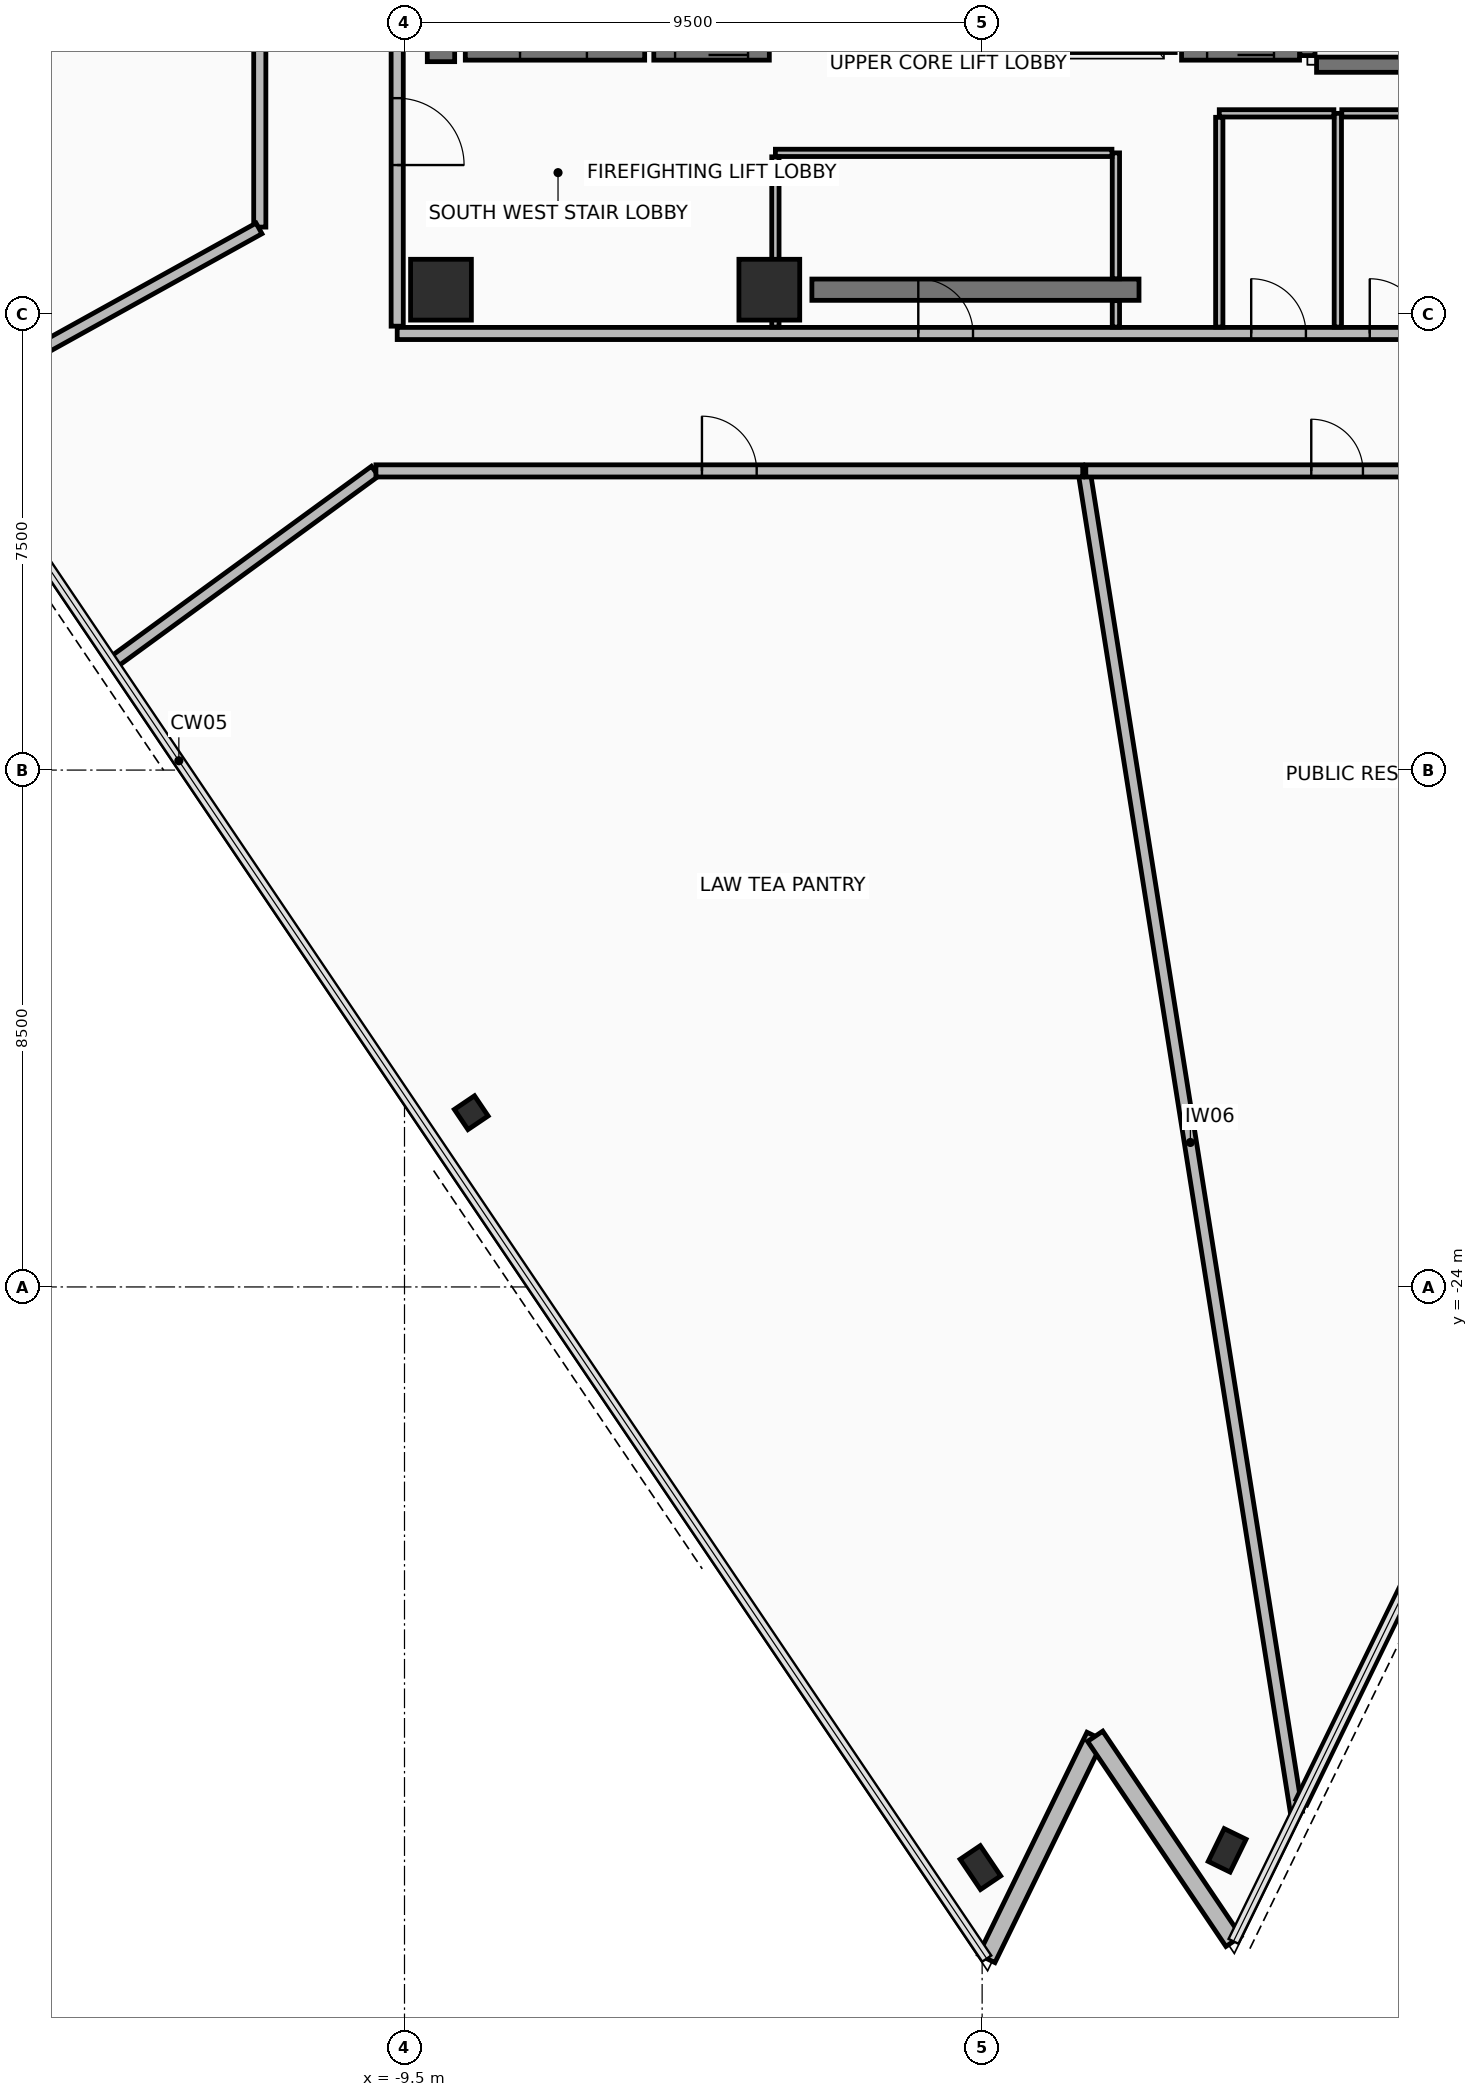
"""IFC4 building model, lengths in metres.
Left out: names, types, materials, properties, quantities, classifications, styles, units other than length and angle.
Written with IfcOpenShell. Run it as: python <this file> out.ifc"""

import sys

from ifc_helpers import new_model, si_unit, direction, frame, frame_2d, origin, origin_2d, place, context, subcontext, project, spatial, rectangle, hollow_rectangle, extrude, element, fill, save


model = new_model("IFC4")
c1 = context("Model", 3, precision=1e-05, world=origin(), true_north=direction((0.0, 1.0)))
c2 = subcontext(c1, "Body", "Model", "MODEL_VIEW")
j1 = project(units=[si_unit("LENGTHUNIT", "METRE"), si_unit("PLANEANGLEUNIT", "RADIAN")], contexts=[c1])
p1 = place(None, origin())
s1 = spatial("IfcSite", under=j1, at=p1, CompositionType="ELEMENT")
p2 = place(p1, origin())
s2 = spatial("IfcBuilding", under=s1, at=p2, CompositionType="ELEMENT")
p3 = place(p2, frame((0.0, 0.0, 267.8)))
s3 = spatial("IfcBuildingStorey", under=s2, at=p3, CompositionType="ELEMENT", Elevation=267.8)
for number, where, z_axis, x_axis in (
    (1, (-8.9, -7.6, 0.0), (0.0, 0.0, 1.0), (1.0, 0.0, 0.0)),
    (2, (-3.5, -7.6, 0.0), (0.0, 0.0, 1.0), (1.0, 0.0, 0.0)),
):
    element("IfcColumn", number, at=place(p3, frame(where, z_axis=z_axis, x_axis=x_axis)), inside=s3, PredefinedType="COLUMN", context=c2, shape_type="SweptSolid", body=[
        extrude(rectangle(XDim=1.0, YDim=1.0, at=origin_2d()), origin(), (0.0, 0.0, 1.0), 3.6),
    ])
p4 = place(p3, frame((-8.402, -21.135, 0.0), z_axis=(0.0, 0.0, 1.0), x_axis=(-0.559192903471, 0.829037572555, 0.0)))
e3 = element("IfcColumn", 3, at=p4, inside=s3, PredefinedType="COLUMN", context=c2, shape_type="SweptSolid", body=[
    extrude(hollow_rectangle(XDim=0.4, YDim=0.4, WallThickness=0.025, at=origin_2d()), origin(), (0.0, 0.0, 1.0), 3.6),
])
for number, where, z_axis, x_axis in (
    (4, (-0.029, -33.549, 0.0), (0.0, 0.0, 1.0), (-0.559, 0.829, 0.0)),
    (5, (4.029, -33.265, 0.0), (0.0, 0.0, 1.0), (0.438, 0.899, 0.0)),
):
    element("IfcColumn", number, at=place(p3, frame(where, z_axis=z_axis, x_axis=x_axis)), inside=s3, PredefinedType="COLUMN", context=c2, shape_type="SweptSolid", body=[
        extrude(hollow_rectangle(XDim=0.4, YDim=0.6, WallThickness=0.03, at=origin_2d()), origin(), (0.0, 0.0, 1.0), 3.6),
    ])
p5 = place(p3, frame((0.076, -35.045, 0.0), z_axis=(0.0, 0.0, 1.0), x_axis=(0.438357414153, 0.898800744024, 0.0)))
e6 = element("IfcWall", 6, at=p5, inside=s3, PredefinedType="STANDARD", context=c2, shape_type="SweptSolid", body=[
    extrude(rectangle(XDim=4.068, YDim=0.3, at=frame_2d((2.034, 0.0))), origin(), (0.0, 0.0, 1.0), 2.765),
])
p6 = place(p3, frame((1.859, -31.389, 0.0), z_axis=(0.0, 0.0, 1.0), x_axis=(0.559206900681, -0.829028131145, 0.0)))
e7 = element("IfcWall", 7, at=p6, inside=s3, PredefinedType="STANDARD", context=c2, shape_type="SweptSolid", body=[
    extrude(rectangle(XDim=4.068, YDim=0.3, at=frame_2d((2.034, 0.0))), origin(), (0.0, 0.0, 1.0), 2.765),
])
p7 = place(p3, frame((-2.8, -7.6, 0.0), z_axis=(0.0, 0.0, 1.0), x_axis=(1.0, 0.0, 0.0)))
e8 = element("IfcWall", 8, at=p7, inside=s3, PredefinedType="SHEAR", context=c2, shape_type="SweptSolid", body=[
    extrude(rectangle(XDim=5.38, YDim=0.35, at=frame_2d((2.69, 0.0))), origin(), (0.0, 0.0, 1.0), 3.42),
])
p8 = place(p3, frame((-8.9, -3.85, 0.0), z_axis=(0.0, 0.0, 1.0), x_axis=(0.0, 1.0, 0.0)))
e9 = element("IfcWall", 9, at=p8, inside=s3, PredefinedType="SHEAR", context=c2, shape_type="SweptSolid", body=[
    extrude(rectangle(XDim=10.7, YDim=0.45, at=frame_2d((5.35, 0.0))), origin(), (0.0, 0.0, 1.0), 3.42),
])
p9 = place(p3, frame((-9.62, -8.32, 0.0), z_axis=(0.0, 0.0, 1.0), x_axis=(1.0, 0.0, 0.0)))
e10 = element("IfcWall", 10, at=p9, inside=s3, PredefinedType="PARTITIONING", context=c2, shape_type="SweptSolid", body=[
    extrude(rectangle(XDim=19.24, YDim=0.2, at=frame_2d((9.62, 0.0))), origin(), (0.0, 0.0, 1.0), 2.915),
])
p10 = place(p9, frame((8.57, 0.0, 0.0)))
e11 = element("IfcOpeningElement", 11, at=p10, cuts=e10, PredefinedType="OPENING", context=c2, shape_type="SweptSolid", body=[
    extrude(rectangle(XDim=0.9, YDim=2.1, at=frame_2d((0.45, 1.05))), frame((0.0, 0.11, 0.0), z_axis=(0.0, -1.0, 0.0), x_axis=(1.0, 0.0, 0.0)), (0.0, 0.0, 1.0), 0.22),
])
p11 = place(p9, frame((14.045, 0.0, 0.0)))
e12 = element("IfcOpeningElement", 12, at=p11, cuts=e10, PredefinedType="OPENING", context=c2, shape_type="SweptSolid", body=[
    extrude(rectangle(XDim=0.9, YDim=2.1, at=frame_2d((0.45, 1.05))), frame((0.0, 0.11, 0.0), z_axis=(0.0, -1.0, 0.0), x_axis=(1.0, 0.0, 0.0)), (0.0, 0.0, 1.0), 0.22),
])
p12 = place(p9, frame((15.995, 0.0, 0.0)))
e13 = element("IfcOpeningElement", 13, at=p12, cuts=e10, PredefinedType="OPENING", context=c2, shape_type="SweptSolid", body=[
    extrude(rectangle(XDim=0.9, YDim=2.1, at=frame_2d((0.45, 1.05))), frame((0.0, 0.11, 0.0), z_axis=(0.0, -1.0, 0.0), x_axis=(1.0, 0.0, 0.0)), (0.0, 0.0, 1.0), 0.22),
])
p13 = place(p3, frame((-9.62, 8.2, 0.0), z_axis=(0.0, 0.0, 1.0), x_axis=(0.0, -1.0, 0.0)))
e14 = element("IfcWall", 14, at=p13, inside=s3, PredefinedType="PARTITIONING", context=c2, shape_type="SweptSolid", body=[
    extrude(rectangle(XDim=16.4, YDim=0.2, at=frame_2d((8.2, 0.0))), origin(), (0.0, 0.0, 1.0), 2.765),
])
p14 = place(p13, frame((12.65, 0.0, 0.0)))
e15 = element("IfcOpeningElement", 15, at=p14, cuts=e14, PredefinedType="OPENING", context=c2, shape_type="SweptSolid", body=[
    extrude(rectangle(XDim=1.1, YDim=2.15, at=frame_2d((0.55, 1.075))), frame((0.0, 0.11, 0.0), z_axis=(0.0, -1.0, 0.0), x_axis=(1.0, 0.0, 0.0)), (0.0, 0.0, 1.0), 0.22),
])
p15 = place(p3, frame((-8.5, -3.7, 0.0), z_axis=(0.0, 0.0, 1.0), x_axis=(1.0, 0.0, 0.0)))
e16 = element("IfcWall", 16, at=p15, inside=s3, PredefinedType="SHEAR", context=c2, shape_type="SweptSolid", body=[
    extrude(rectangle(XDim=2.95, YDim=0.25, at=frame_2d((1.475, 0.0))), origin(), (0.0, 0.0, 1.0), 3.42),
])
p16 = place(p15, frame((0.9, 0.0, 0.0)))
e17 = element("IfcOpeningElement", 17, at=p16, cuts=e16, PredefinedType="OPENING", context=c2, shape_type="SweptSolid", body=[
    extrude(rectangle(XDim=1.1, YDim=2.15, at=frame_2d((0.55, 1.075))), frame((0.0, 0.135, 0.0), z_axis=(0.0, -1.0, 0.0), x_axis=(1.0, 0.0, 0.0)), (0.0, 0.0, 1.0), 0.27),
])
p17 = place(p3, frame((5.35, -3.75, 0.0), z_axis=(0.0, 0.0, 1.0), x_axis=(0.0, 1.0, 0.0)))
e18 = element("IfcWall", 18, at=p17, inside=s3, PredefinedType="SHEAR", context=c2, shape_type="SweptSolid", body=[
    extrude(rectangle(XDim=7.3, YDim=0.25, at=frame_2d((3.65, 0.0))), origin(), (0.0, 0.0, 1.0), 3.42),
])
p18 = place(p3, frame((5.5, -3.9, 0.0), z_axis=(0.0, 0.0, 1.0), x_axis=(1.0, 0.0, 0.0)))
e19 = element("IfcWall", 19, at=p18, inside=s3, PredefinedType="SHEAR", context=c2, shape_type="SweptSolid", body=[
    extrude(rectangle(XDim=3.0, YDim=0.25, at=frame_2d((1.5, 0.0))), origin(), (0.0, 0.0, 1.0), 3.42),
])
p19 = place(p3, frame((1.13, -3.6, 0.0), z_axis=(0.0, 0.0, 1.0), x_axis=(1.0, 0.0, 0.0)))
e20 = element("IfcWall", 20, at=p19, inside=s3, PredefinedType="PARTITIONING", context=c2, shape_type="SweptSolid", body=[
    extrude(rectangle(XDim=2.045, YDim=0.2, at=frame_2d((1.022, 0.0))), origin(), (0.0, 0.0, 1.0), 3.42),
])
p20 = place(p3, frame((-5.4, -3.7, 0.0), z_axis=(0.0, 0.0, 1.0), x_axis=(1.0, 0.0, 0.0)))
e21 = element("IfcWall", 21, at=p20, inside=s3, PredefinedType="SHEAR", context=c2, shape_type="SweptSolid", body=[
    extrude(rectangle(XDim=1.9, YDim=0.25, at=frame_2d((0.95, 0.0))), origin(), (0.0, 0.0, 1.0), 3.42),
])
p21 = place(p20, frame((0.35, 0.0, 0.0)))
e22 = element("IfcOpeningElement", 22, at=p21, cuts=e21, PredefinedType="OPENING", context=c2, shape_type="SweptSolid", body=[
    extrude(rectangle(XDim=1.2, YDim=2.2, at=frame_2d((0.6, 1.1))), frame((0.0, 0.135, 0.0), z_axis=(0.0, -1.0, 0.0), x_axis=(1.0, 0.0, 0.0)), (0.0, 0.0, 1.0), 0.27),
])
p22 = place(p3, frame((3.28, -3.7, 0.0), z_axis=(0.0, 0.0, 1.0), x_axis=(1.0, 0.0, 0.0)))
e23 = element("IfcWall", 23, at=p22, inside=s3, PredefinedType="SHEAR", context=c2, shape_type="SweptSolid", body=[
    extrude(rectangle(XDim=1.94, YDim=0.25, at=frame_2d((0.97, 0.0))), origin(), (0.0, 0.0, 1.0), 3.42),
])
p23 = place(p22, frame((0.42, 0.0, 0.0)))
e24 = element("IfcOpeningElement", 24, at=p23, cuts=e23, PredefinedType="OPENING", context=c2, shape_type="SweptSolid", body=[
    extrude(rectangle(XDim=1.1, YDim=2.2, at=frame_2d((0.55, 1.1))), frame((0.0, 0.135, 0.0), z_axis=(0.0, -1.0, 0.0), x_axis=(1.0, 0.0, 0.0)), (0.0, 0.0, 1.0), 0.27),
])
p24 = place(p3, frame((2.2, -8.215, 0.0), z_axis=(0.0, 0.0, 1.0), x_axis=(0.0, 1.0, 0.0)))
e25 = element("IfcWall", 25, at=p24, inside=s3, PredefinedType="PARTITIONING", context=c2, shape_type="SweptSolid", body=[
    extrude(rectangle(XDim=0.435, YDim=0.12, at=frame_2d((0.218, 0.0))), origin(), (0.0, 0.0, 1.0), 2.715),
])
p25 = place(p3, frame((2.2, -7.42, 0.0), z_axis=(0.0, 0.0, 1.0), x_axis=(0.0, 1.0, 0.0)))
e26 = element("IfcWall", 26, at=p25, inside=s3, PredefinedType="PARTITIONING", context=c2, shape_type="SweptSolid", body=[
    extrude(rectangle(XDim=2.07, YDim=0.12, at=frame_2d((1.035, 0.0))), origin(), (0.0, 0.0, 1.0), 2.715),
])
p26 = place(p3, frame((2.135, -5.35, 0.0), z_axis=(0.0, 0.0, 1.0), x_axis=(-1.0, 0.0, 0.0)))
e27 = element("IfcWall", 27, at=p26, inside=s3, PredefinedType="PARTITIONING", context=c2, shape_type="SweptSolid", body=[
    extrude(rectangle(XDim=5.535, YDim=0.12, at=frame_2d((2.768, 0.0))), origin(), (0.0, 0.0, 1.0), 2.715),
])
p27 = place(p3, frame((-3.4, -5.415, 0.0), z_axis=(0.0, 0.0, 1.0), x_axis=(0.0, -1.0, 0.0)))
e28 = element("IfcWall", 28, at=p27, inside=s3, PredefinedType="PARTITIONING", context=c2, shape_type="SweptSolid", body=[
    extrude(rectangle(XDim=2.8, YDim=0.12, at=frame_2d((1.4, 0.0))), origin(), (0.0, 0.0, 1.0), 2.715),
])
p28 = place(p3, frame((5.85, -8.215, 0.0), z_axis=(0.0, 0.0, 1.0), x_axis=(0.0, 1.0, 0.0)))
e29 = element("IfcWall", 29, at=p28, inside=s3, PredefinedType="PARTITIONING", context=c2, shape_type="SweptSolid", body=[
    extrude(rectangle(XDim=3.515, YDim=0.12, at=frame_2d((1.758, 0.0))), origin(), (0.0, 0.0, 1.0), 2.715),
])
p29 = place(p3, frame((5.785, -4.7, 0.0), z_axis=(0.0, 0.0, 1.0), x_axis=(-1.0, 0.0, 0.0)))
e30 = element("IfcWall", 30, at=p29, inside=s3, PredefinedType="PARTITIONING", context=c2, shape_type="SweptSolid", body=[
    extrude(rectangle(XDim=1.885, YDim=0.12, at=frame_2d((0.942, 0.0))), origin(), (0.0, 0.0, 1.0), 3.42),
])
p30 = place(p3, frame((3.9, -4.765, 0.0), z_axis=(0.0, 0.0, 1.0), x_axis=(0.0, -1.0, 0.0)))
e31 = element("IfcWall", 31, at=p30, inside=s3, PredefinedType="PARTITIONING", context=c2, shape_type="SweptSolid", body=[
    extrude(rectangle(XDim=3.45, YDim=0.12, at=frame_2d((1.725, 0.0))), origin(), (0.0, 0.0, 1.0), 2.715),
])
p31 = place(p3, frame((7.735, -4.7, 0.0), z_axis=(0.0, 0.0, 1.0), x_axis=(-1.0, 0.0, 0.0)))
e32 = element("IfcWall", 32, at=p31, inside=s3, PredefinedType="PARTITIONING", context=c2, shape_type="SweptSolid", body=[
    extrude(rectangle(XDim=1.82, YDim=0.12, at=frame_2d((0.91, 0.0))), origin(), (0.0, 0.0, 1.0), 3.42),
])
p32 = place(p3, frame((5.169, -32.639, 0.0), z_axis=(0.0, 0.0, 1.0), x_axis=(-0.156427400595, 0.987689459468, 0.0)))
e33 = element("IfcWall", 33, at=p32, inside=s3, PredefinedType="PARTITIONING", context=c2, shape_type="SweptSolid", body=[
    extrude(rectangle(XDim=22.304, YDim=0.2, at=frame_2d((11.152, 0.0))), origin(), (0.0, 0.0, 1.0), 2.765),
])
p33 = place(p3, frame((1.705, -10.58, 0.0), z_axis=(0.0, 0.0, 1.0), x_axis=(1.0, 0.0, 0.0)))
e34 = element("IfcWall", 34, at=p33, inside=s3, PredefinedType="PARTITIONING", context=c2, shape_type="SweptSolid", body=[
    extrude(rectangle(XDim=8.265, YDim=0.2, at=frame_2d((4.132, 0.0))), origin(), (0.0, 0.0, 1.0), 2.915),
])
p34 = place(p33, frame((3.708, 0.0, 0.0)))
e35 = element("IfcOpeningElement", 35, at=p34, cuts=e34, PredefinedType="OPENING", context=c2, shape_type="SweptSolid", body=[
    extrude(rectangle(XDim=0.85, YDim=2.1, at=frame_2d((0.425, 1.05))), frame((0.0, 0.11, 0.0), z_axis=(0.0, -1.0, 0.0), x_axis=(1.0, 0.0, 0.0)), (0.0, 0.0, 1.0), 0.22),
])
p35 = place(p3, frame((14.361, -13.793, 0.0), z_axis=(0.0, 0.0, 1.0), x_axis=(-0.438372717421, -0.898793280249, 0.0)))
e36 = element("IfcWall", 36, at=p35, inside=s3, PredefinedType="PARTITIONING", context=c2, shape_type="SweptSolid", body=[
    extrude(rectangle(XDim=20.784, YDim=0.2, at=frame_2d((10.392, 0.0))), origin(), (0.0, 0.0, 1.0), 3.42),
])
p36 = place(p3, frame((-11.88, 9.27, 0.0), z_axis=(0.0, 0.0, 1.0), x_axis=(0.0, -1.0, 0.0)))
e37 = element("IfcWall", 37, at=p36, inside=s3, PredefinedType="PARTITIONING", context=c2, shape_type="SweptSolid", body=[
    extrude(rectangle(XDim=15.84, YDim=0.2, at=frame_2d((7.92, 0.0))), origin(), (0.0, 0.0, 1.0), 2.765),
])
p37 = place(p36, frame((7.42, 0.0, 0.0)))
e38 = element("IfcOpeningElement", 38, at=p37, cuts=e37, PredefinedType="OPENING", context=c2, shape_type="SweptSolid", body=[
    extrude(rectangle(XDim=1.0, YDim=2.15, at=frame_2d((0.5, 1.075))), frame((0.0, 0.11, 0.0), z_axis=(0.0, -1.0, 0.0), x_axis=(1.0, 0.0, 0.0)), (0.0, 0.0, 1.0), 0.22),
])
p38 = place(p3, frame((-11.893, -6.592, 0.0), z_axis=(0.0, 0.0, 1.0), x_axis=(-0.874620360133, -0.484808442213, 0.0)))
e39 = element("IfcWall", 39, at=p38, inside=s3, PredefinedType="PARTITIONING", context=c2, shape_type="SweptSolid", body=[
    extrude(rectangle(XDim=5.988, YDim=0.2, at=frame_2d((2.994, 0.0))), origin(), (0.0, 0.0, 1.0), 2.765),
])
p39 = place(p3, frame((-14.3, -13.733, 0.0), z_axis=(0.0, 0.0, 1.0), x_axis=(0.807823888807, 0.589423926111, 0.0)))
e40 = element("IfcWall", 40, at=p39, inside=s3, PredefinedType="PARTITIONING", context=c2, shape_type="SweptSolid", body=[
    extrude(rectangle(XDim=5.341, YDim=0.2, at=frame_2d((2.67, 0.0))), origin(), (0.0, 0.0, 1.0), 2.765),
])
p40 = place(p3, frame((-9.97, -10.58, 0.0), z_axis=(0.0, 0.0, 1.0), x_axis=(1.0, 0.0, 0.0)))
e41 = element("IfcWall", 41, at=p40, inside=s3, PredefinedType="PARTITIONING", context=c2, shape_type="SweptSolid", body=[
    extrude(rectangle(XDim=11.624, YDim=0.2, at=frame_2d((5.812, 0.0))), origin(), (0.0, 0.0, 1.0), 2.915),
])
p41 = place(p40, frame((5.362, 0.0, 0.0)))
e42 = element("IfcOpeningElement", 42, at=p41, cuts=e41, PredefinedType="OPENING", context=c2, shape_type="SweptSolid", body=[
    extrude(rectangle(XDim=0.9, YDim=2.1, at=frame_2d((0.45, 1.05))), frame((0.0, 0.11, 0.0), z_axis=(0.0, -1.0, 0.0), x_axis=(1.0, 0.0, 0.0)), (0.0, 0.0, 1.0), 0.22),
])
p42 = place(p14, frame((1.1, 0.0, 0.0), z_axis=(0.0, 0.0, 1.0), x_axis=(-1.0, 0.0, 0.0)))
e43 = element("IfcDoor", 43, at=p42, inside=s3, OperationType="SINGLE_SWING_LEFT", PredefinedType="DOOR", context=c2, shape_type="SweptSolid", body=[
    extrude(rectangle(XDim=1.1, YDim=2.15, at=frame_2d((0.55, 1.075))), frame((0.0, 0.025, 0.0), z_axis=(0.0, -1.0, 0.0), x_axis=(1.0, 0.0, 0.0)), (0.0, 0.0, 1.0), 0.05),
])
fill(e15, e43)
p43 = place(p16, origin())
e44 = element("IfcDoor", 44, at=p43, inside=s3, OperationType="SINGLE_SWING_LEFT", PredefinedType="DOOR", context=c2, shape_type="SweptSolid", body=[
    extrude(rectangle(XDim=1.1, YDim=2.15, at=frame_2d((0.55, 1.075))), frame((0.0, 0.025, 0.0), z_axis=(0.0, -1.0, 0.0), x_axis=(1.0, 0.0, 0.0)), (0.0, 0.0, 1.0), 0.05),
])
fill(e17, e44)
p44 = place(p21, origin())
e45 = element("IfcDoor", 45, at=p44, inside=s3, OperationType="SLIDING_TO_RIGHT", PredefinedType="DOOR", context=c2, shape_type="SweptSolid", body=[
    extrude(rectangle(XDim=1.2, YDim=2.2, at=frame_2d((0.6, 1.1))), frame((0.0, 0.025, 0.0), z_axis=(0.0, -1.0, 0.0), x_axis=(1.0, 0.0, 0.0)), (0.0, 0.0, 1.0), 0.05),
])
fill(e22, e45)
p45 = place(p23, origin())
e46 = element("IfcDoor", 46, at=p45, inside=s3, OperationType="SLIDING_TO_LEFT", PredefinedType="DOOR", context=c2, shape_type="SweptSolid", body=[
    extrude(rectangle(XDim=1.1, YDim=2.2, at=frame_2d((0.55, 1.1))), frame((0.0, 0.025, 0.0), z_axis=(0.0, -1.0, 0.0), x_axis=(1.0, 0.0, 0.0)), (0.0, 0.0, 1.0), 0.05),
])
fill(e24, e46)
p46 = place(p10, origin())
e47 = element("IfcDoor", 47, at=p46, inside=s3, OperationType="SINGLE_SWING_LEFT", PredefinedType="DOOR", context=c2, shape_type="SweptSolid", body=[
    extrude(rectangle(XDim=0.9, YDim=2.1, at=frame_2d((0.45, 1.05))), frame((0.0, 0.025, 0.0), z_axis=(0.0, -1.0, 0.0), x_axis=(1.0, 0.0, 0.0)), (0.0, 0.0, 1.0), 0.05),
])
fill(e11, e47)
p47 = place(p11, origin())
e48 = element("IfcDoor", 48, at=p47, inside=s3, OperationType="SINGLE_SWING_LEFT", PredefinedType="DOOR", context=c2, shape_type="SweptSolid", body=[
    extrude(rectangle(XDim=0.9, YDim=2.1, at=frame_2d((0.45, 1.05))), frame((0.0, 0.025, 0.0), z_axis=(0.0, -1.0, 0.0), x_axis=(1.0, 0.0, 0.0)), (0.0, 0.0, 1.0), 0.05),
])
fill(e12, e48)
p48 = place(p12, origin())
e49 = element("IfcDoor", 49, at=p48, inside=s3, OperationType="SINGLE_SWING_LEFT", PredefinedType="DOOR", context=c2, shape_type="SweptSolid", body=[
    extrude(rectangle(XDim=0.9, YDim=2.1, at=frame_2d((0.45, 1.05))), frame((0.0, 0.025, 0.0), z_axis=(0.0, -1.0, 0.0), x_axis=(1.0, 0.0, 0.0)), (0.0, 0.0, 1.0), 0.05),
])
fill(e13, e49)
p49 = place(p34, origin())
e50 = element("IfcDoor", 50, at=p49, inside=s3, OperationType="SINGLE_SWING_RIGHT", PredefinedType="DOOR", context=c2, shape_type="SweptSolid", body=[
    extrude(rectangle(XDim=0.85, YDim=2.1, at=frame_2d((0.425, 1.05))), frame((0.0, 0.025, 0.0), z_axis=(0.0, -1.0, 0.0), x_axis=(1.0, 0.0, 0.0)), (0.0, 0.0, 1.0), 0.05),
])
fill(e35, e50)
p50 = place(p41, origin())
e51 = element("IfcDoor", 51, at=p50, inside=s3, OperationType="SINGLE_SWING_LEFT", PredefinedType="DOOR", context=c2, shape_type="SweptSolid", body=[
    extrude(rectangle(XDim=0.9, YDim=2.1, at=frame_2d((0.45, 1.05))), frame((0.0, 0.025, 0.0), z_axis=(0.0, -1.0, 0.0), x_axis=(1.0, 0.0, 0.0)), (0.0, 0.0, 1.0), 0.05),
])
fill(e42, e51)
save(model, sys.argv[1])
